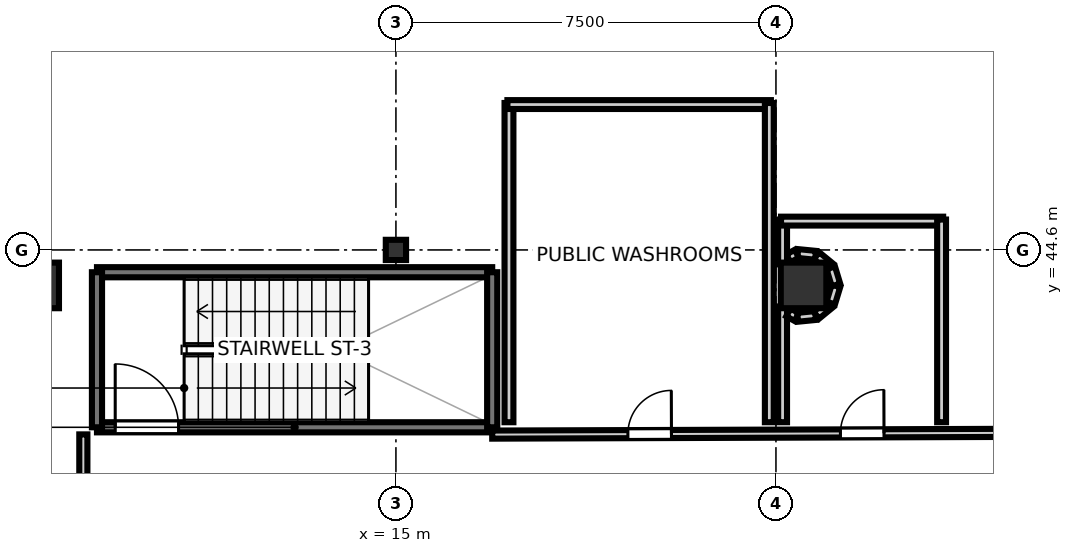
"""IFC4 building model, lengths in metres.
Left out: names, types, materials, properties, quantities, classifications, styles, units other than length and angle.
Written with IfcOpenShell. Run it as: python <this file> out.ifc"""

import sys

from ifc_helpers import new_model, si_unit, direction, frame, frame_2d, origin, origin_2d, place, context, subcontext, project, spatial, rectangle, i_section, extrude, element, fill, save


model = new_model("IFC4")
c1 = context("Model", 3, precision=1e-05, world=origin(), true_north=direction((0.0, 1.0)))
c2 = subcontext(c1, "Body", "Model", "MODEL_VIEW")
j1 = project(units=[si_unit("LENGTHUNIT", "METRE"), si_unit("PLANEANGLEUNIT", "RADIAN")], contexts=[c1])
p1 = place(None, origin())
s1 = spatial("IfcSite", under=j1, at=p1, CompositionType="ELEMENT")
p2 = place(p1, origin())
s2 = spatial("IfcBuilding", under=s1, at=p2, CompositionType="ELEMENT")
p3 = place(p2, frame((0.0, 0.0, 11.0)))
s3 = spatial("IfcBuildingStorey", under=s2, at=p3, CompositionType="ELEMENT", Elevation=11.0)
for number, where, z_axis, x_axis in (
    (1, (7.9, 43.9, 0.0), (0.0, 0.0, 1.0), (1.0, 0.0, 0.0)),
    (2, (23.045, 43.9, 0.0), (0.0, 0.0, 1.0), (1.0, 0.0, 0.0)),
):
    element("IfcColumn", number, at=place(p3, frame(where, z_axis=z_axis, x_axis=x_axis)), inside=s3, PredefinedType="COLUMN", context=c2, shape_type="SweptSolid", body=[
        extrude(rectangle(XDim=0.9, YDim=0.9, at=origin_2d()), origin(), (0.0, 0.0, 1.0), 4.8),
    ])
p4 = place(p3, frame((15.0, 44.6, 0.0), z_axis=(0.0, 0.0, 1.0), x_axis=(1.0, 0.0, 0.0)))
e3 = element("IfcColumn", 3, at=p4, inside=s3, PredefinedType="COLUMN", context=c2, shape_type="SweptSolid", body=[
    extrude(i_section(OverallWidth=0.4, OverallDepth=0.4, WebThickness=0.013, FlangeThickness=0.021, at=origin_2d()), origin(), (0.0, 0.0, 1.0), 4.8),
])
p5 = place(p3, frame((9.1, 41.1, 0.0), z_axis=(0.0, 0.0, 1.0), x_axis=(1.0, 0.0, 0.0)))
e4 = element("IfcWall", 4, at=p5, inside=s3, PredefinedType="SOLIDWALL", context=c2, shape_type="SweptSolid", body=[
    extrude(rectangle(XDim=7.8, YDim=0.2, at=frame_2d((3.9, 0.0))), origin(), (0.0, 0.0, 1.0), 4.58),
])
p6 = place(p5, frame((0.36, 0.0, 0.0)))
e5 = element("IfcOpeningElement", 5, at=p6, cuts=e4, PredefinedType="OPENING", context=c2, shape_type="SweptSolid", body=[
    extrude(rectangle(XDim=1.25, YDim=2.15, at=frame_2d((0.625, 1.075))), frame((0.0, 0.11, 0.0), z_axis=(0.0, -1.0, 0.0), x_axis=(1.0, 0.0, 0.0)), (0.0, 0.0, 1.0), 0.22),
])
p7 = place(p3, frame((9.1, 44.16, 0.0), z_axis=(0.0, 0.0, 1.0), x_axis=(1.0, 0.0, 0.0)))
e6 = element("IfcWall", 6, at=p7, inside=s3, PredefinedType="SOLIDWALL", context=c2, shape_type="SweptSolid", body=[
    extrude(rectangle(XDim=7.8, YDim=0.2, at=frame_2d((3.9, 0.0))), origin(), (0.0, 0.0, 1.0), 4.58),
])
for number, where, z_axis, x_axis in (
    (7, (9.1, 41.1, 0.0), (0.0, 0.0, 1.0), (0.0, 1.0, 0.0)),
    (8, (16.9, 41.1, 0.0), (0.0, 0.0, 1.0), (0.0, 1.0, 0.0)),
):
    element("IfcWall", number, at=place(p3, frame(where, z_axis=z_axis, x_axis=x_axis)), inside=s3, PredefinedType="SOLIDWALL", context=c2, shape_type="SweptSolid", body=[
        extrude(rectangle(XDim=3.06, YDim=0.2, at=frame_2d((1.53, 0.0))), origin(), (0.0, 0.0, 1.0), 4.58),
    ])
p8 = place(p3, frame((8.831, 37.8, 0.0), z_axis=(0.0, 0.0, 1.0), x_axis=(0.0, 1.0, 0.0)))
e9 = element("IfcWall", 9, at=p8, inside=s3, PredefinedType="PARTITIONING", context=c2, shape_type="SweptSolid", body=[
    extrude(rectangle(XDim=3.16, YDim=0.16, at=frame_2d((1.58, 0.0))), origin(), (0.0, 0.0, 1.0), 3.1),
])
p9 = place(p3, frame((16.9, 40.956, 0.0), z_axis=(0.0, 0.0, 1.0), x_axis=(0.999994432489, 0.003336913407, 0.0)))
e10 = element("IfcWall", 10, at=p9, inside=s3, PredefinedType="PARTITIONING", context=c2, shape_type="SweptSolid", body=[
    extrude(rectangle(XDim=9.95, YDim=0.16, at=frame_2d((4.975, 0.0))), origin(), (0.0, 0.0, 1.0), 3.1),
])
p10 = place(p9, frame((6.873, 0.0, 0.0)))
e11 = element("IfcOpeningElement", 11, at=p10, cuts=e10, PredefinedType="OPENING", context=c2, shape_type="SweptSolid", body=[
    extrude(rectangle(XDim=0.86, YDim=2.05, at=frame_2d((0.43, 1.025))), frame((0.0, 0.09, 0.0), z_axis=(0.0, -1.0, 0.0), x_axis=(1.0, 0.0, 0.0)), (0.0, 0.0, 1.0), 0.18),
])
p11 = place(p9, frame((2.678, 0.0, 0.0)))
e12 = element("IfcOpeningElement", 12, at=p11, cuts=e10, PredefinedType="OPENING", context=c2, shape_type="SweptSolid", body=[
    extrude(rectangle(XDim=0.86, YDim=2.05, at=frame_2d((0.43, 1.025))), frame((0.0, 0.09, 0.0), z_axis=(0.0, -1.0, 0.0), x_axis=(1.0, 0.0, 0.0)), (0.0, 0.0, 1.0), 0.18),
])
p12 = place(p3, frame((22.631, 41.2, 0.0), z_axis=(0.0, 0.0, 1.0), x_axis=(0.0, 1.0, 0.0)))
e13 = element("IfcWall", 13, at=p12, inside=s3, PredefinedType="PLUMBINGWALL", context=c2, shape_type="SweptSolid", body=[
    extrude(rectangle(XDim=2.285, YDim=0.175, at=frame_2d((1.143, 0.0))), origin(), (0.0, 0.0, 1.0), 3.1),
])
p13 = place(p3, frame((22.746, 43.367, 0.0), z_axis=(0.0, 0.0, 1.0), x_axis=(0.871575537125, -0.490261239633, 0.0)))
e14 = element("IfcWall", 14, at=p13, inside=s3, PredefinedType="PLUMBINGWALL", context=c2, shape_type="SweptSolid", body=[
    extrude(rectangle(XDim=0.188, YDim=0.175, at=frame_2d((0.094, 0.0))), origin(), (0.0, 0.0, 1.0), 3.1),
])
p14 = place(p3, frame((22.929, 43.271, 0.0), z_axis=(0.0, 0.0, 1.0), x_axis=(0.995193004206, 0.097933060705, 0.0)))
e15 = element("IfcWall", 15, at=p14, inside=s3, PredefinedType="PLUMBINGWALL", context=c2, shape_type="SweptSolid", body=[
    extrude(rectangle(XDim=0.354, YDim=0.175, at=frame_2d((0.177, 0.0))), origin(), (0.0, 0.0, 1.0), 3.1),
])
for number, where, z_axis, x_axis in (
    (16, (23.298, 43.312, 0.0), (0.0, 0.0, 1.0), (0.773, 0.634, 0.0)),
    (17, (23.582, 43.552, 0.0), (0.0, 0.0, 1.0), (0.29, 0.957, 0.0)),
):
    element("IfcWall", number, at=place(p3, frame(where, z_axis=z_axis, x_axis=x_axis)), inside=s3, PredefinedType="PLUMBINGWALL", context=c2, shape_type="SweptSolid", body=[
        extrude(rectangle(XDim=0.354, YDim=0.175, at=frame_2d((0.177, 0.0))), origin(), (0.0, 0.0, 1.0), 3.1),
    ])
p15 = place(p3, frame((23.684, 43.909, 0.0), z_axis=(0.0, 0.0, 1.0), x_axis=(-0.290256142171, 0.956948991291, 0.0)))
e18 = element("IfcWall", 18, at=p15, inside=s3, PredefinedType="PLUMBINGWALL", context=c2, shape_type="SweptSolid", body=[
    extrude(rectangle(XDim=0.354, YDim=0.175, at=frame_2d((0.177, 0.0))), origin(), (0.0, 0.0, 1.0), 3.1),
])
p16 = place(p3, frame((23.572, 44.263, 0.0), z_axis=(0.0, 0.0, 1.0), x_axis=(-0.773281307259, 0.634063103992, 0.0)))
e19 = element("IfcWall", 19, at=p16, inside=s3, PredefinedType="PLUMBINGWALL", context=c2, shape_type="SweptSolid", body=[
    extrude(rectangle(XDim=0.354, YDim=0.175, at=frame_2d((0.177, 0.0))), origin(), (0.0, 0.0, 1.0), 3.1),
])
p17 = place(p3, frame((23.281, 44.494, 0.0), z_axis=(0.0, 0.0, 1.0), x_axis=(-0.995193004206, 0.097933060705, 0.0)))
e20 = element("IfcWall", 20, at=p17, inside=s3, PredefinedType="PLUMBINGWALL", context=c2, shape_type="SweptSolid", body=[
    extrude(rectangle(XDim=0.354, YDim=0.175, at=frame_2d((0.177, 0.0))), origin(), (0.0, 0.0, 1.0), 3.1),
])
p18 = place(p3, frame((22.91, 44.525, 0.0), z_axis=(0.0, 0.0, 1.0), x_axis=(-0.871575537125, -0.490261239633, 0.0)))
e21 = element("IfcWall", 21, at=p18, inside=s3, PredefinedType="PLUMBINGWALL", context=c2, shape_type="SweptSolid", body=[
    extrude(rectangle(XDim=0.188, YDim=0.175, at=frame_2d((0.094, 0.0))), origin(), (0.0, 0.0, 1.0), 3.1),
])
p19 = place(p3, frame((22.631, 44.315, 0.0), z_axis=(0.0, 0.0, 1.0), x_axis=(0.0, 1.0, 0.0)))
e22 = element("IfcWall", 22, at=p19, inside=s3, PredefinedType="PLUMBINGWALL", context=c2, shape_type="SweptSolid", body=[
    extrude(rectangle(XDim=0.885, YDim=0.175, at=frame_2d((0.442, 0.0))), origin(), (0.0, 0.0, 1.0), 3.1),
])
p20 = place(p3, frame((22.6, 45.169, 0.0), z_axis=(0.0, 0.0, 1.0), x_axis=(1.0, 0.0, 0.0)))
e23 = element("IfcWall", 23, at=p20, inside=s3, PredefinedType="PLUMBINGWALL", context=c2, shape_type="SweptSolid", body=[
    extrude(rectangle(XDim=3.2, YDim=0.175, at=frame_2d((1.6, 0.0))), origin(), (0.0, 0.0, 1.0), 3.1),
])
p21 = place(p3, frame((25.769, 45.2, 0.0), z_axis=(0.0, 0.0, 1.0), x_axis=(0.0, -1.0, 0.0)))
e24 = element("IfcWall", 24, at=p21, inside=s3, PredefinedType="PLUMBINGWALL", context=c2, shape_type="SweptSolid", body=[
    extrude(rectangle(XDim=4.0, YDim=0.175, at=frame_2d((2.0, 0.0))), origin(), (0.0, 0.0, 1.0), 3.1),
])
p22 = place(p3, frame((17.231, 41.2, 0.0), z_axis=(0.0, 0.0, 1.0), x_axis=(0.0, 1.0, 0.0)))
e25 = element("IfcWall", 25, at=p22, inside=s3, PredefinedType="PLUMBINGWALL", context=c2, shape_type="SweptSolid", body=[
    extrude(rectangle(XDim=6.3, YDim=0.175, at=frame_2d((3.15, 0.0))), origin(), (0.0, 0.0, 1.0), 3.1),
])
p23 = place(p3, frame((17.2, 47.469, 0.0), z_axis=(0.0, 0.0, 1.0), x_axis=(1.0, 0.0, 0.0)))
e26 = element("IfcWall", 26, at=p23, inside=s3, PredefinedType="PLUMBINGWALL", context=c2, shape_type="SweptSolid", body=[
    extrude(rectangle(XDim=5.2, YDim=0.175, at=frame_2d((2.6, 0.0))), origin(), (0.0, 0.0, 1.0), 3.1),
])
p24 = place(p3, frame((22.369, 47.5, 0.0), z_axis=(0.0, 0.0, 1.0), x_axis=(0.0, -1.0, 0.0)))
e27 = element("IfcWall", 27, at=p24, inside=s3, PredefinedType="PLUMBINGWALL", context=c2, shape_type="SweptSolid", body=[
    extrude(rectangle(XDim=6.3, YDim=0.175, at=frame_2d((3.15, 0.0))), origin(), (0.0, 0.0, 1.0), 3.1),
])
p25 = place(p6, origin())
e28 = element("IfcDoor", 28, at=p25, inside=s3, OperationType="SINGLE_SWING_LEFT", PredefinedType="DOOR", context=c2, shape_type="SweptSolid", body=[
    extrude(rectangle(XDim=1.25, YDim=2.15, at=frame_2d((0.625, 1.075))), frame((0.0, 0.025, 0.0), z_axis=(0.0, -1.0, 0.0), x_axis=(1.0, 0.0, 0.0)), (0.0, 0.0, 1.0), 0.05),
])
fill(e5, e28)
p26 = place(p10, origin())
e29 = element("IfcDoor", 29, at=p26, inside=s3, OperationType="SINGLE_SWING_RIGHT", PredefinedType="DOOR", context=c2, shape_type="SweptSolid", body=[
    extrude(rectangle(XDim=0.86, YDim=2.05, at=frame_2d((0.43, 1.025))), frame((0.0, 0.025, 0.0), z_axis=(0.0, -1.0, 0.0), x_axis=(1.0, 0.0, 0.0)), (0.0, 0.0, 1.0), 0.05),
])
fill(e11, e29)
p27 = place(p11, origin())
e30 = element("IfcDoor", 30, at=p27, inside=s3, OperationType="SINGLE_SWING_RIGHT", PredefinedType="DOOR", context=c2, shape_type="SweptSolid", body=[
    extrude(rectangle(XDim=0.86, YDim=2.05, at=frame_2d((0.43, 1.025))), frame((0.0, 0.025, 0.0), z_axis=(0.0, -1.0, 0.0), x_axis=(1.0, 0.0, 0.0)), (0.0, 0.0, 1.0), 0.05),
])
fill(e12, e30)
save(model, sys.argv[1])
